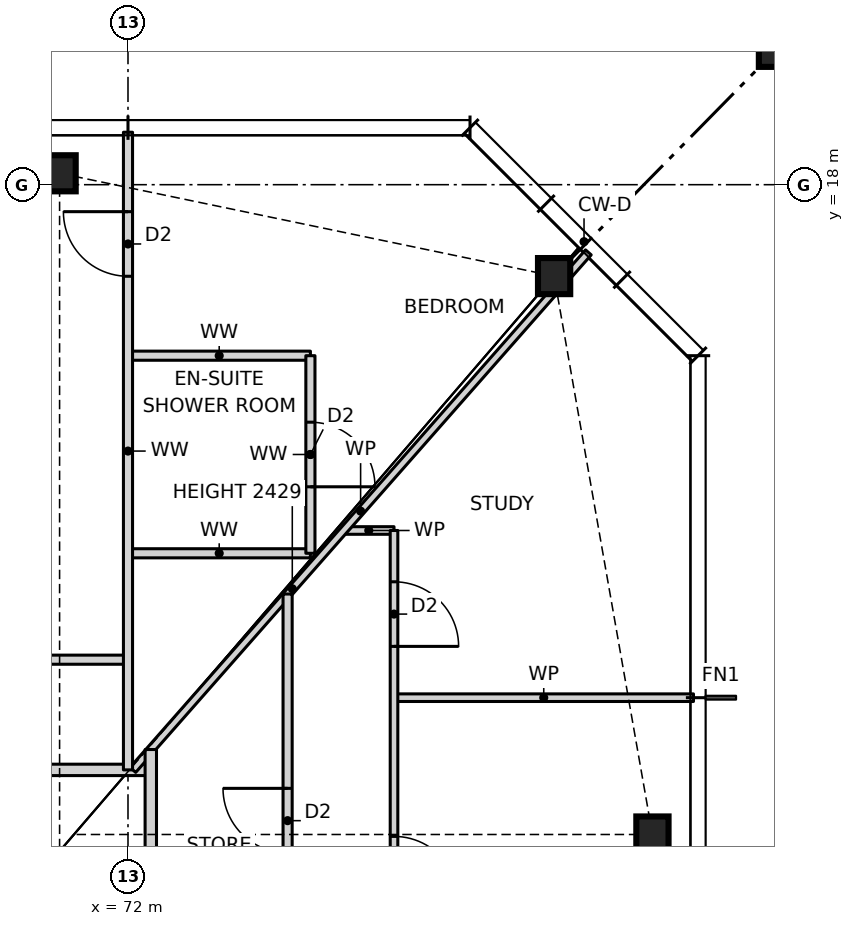
"""IFC4 building model, lengths in metres.
Left out: names, types, materials, properties, quantities, classifications, styles, units other than length and angle.
Written with IfcOpenShell. Run it as: python <this file> out.ifc"""

import sys

from ifc_helpers import new_model, si_unit, direction, frame, frame_2d, origin, origin_2d, place, context, subcontext, project, spatial, rectangle, hollow_rectangle, i_section, extrude, element, fill, save


model = new_model("IFC4")
c1 = context("Model", 3, precision=1e-05, world=origin(), true_north=direction((0.0, 1.0)))
c2 = subcontext(c1, "Body", "Model", "MODEL_VIEW")
j1 = project(units=[si_unit("LENGTHUNIT", "METRE"), si_unit("PLANEANGLEUNIT", "RADIAN")], contexts=[c1])
p1 = place(None, origin())
s1 = spatial("IfcSite", under=j1, at=p1, CompositionType="ELEMENT")
p2 = place(p1, origin())
s2 = spatial("IfcBuilding", under=s1, at=p2, CompositionType="ELEMENT")
p3 = place(p2, frame((0.0, 0.0, 50.0)))
s3 = spatial("IfcBuildingStorey", under=s2, at=p3, CompositionType="ELEMENT", Elevation=50.0)
for number, where, z_axis, x_axis in (
    (1, (78.9, 9.45, 0.0), (0.0, 0.0, 1.0), (1.0, 0.0, 0.0)),
    (2, (77.606, 16.797, 0.0), (0.0, 0.0, 1.0), (1.0, 0.0, 0.0)),
    (3, (71.1, 18.15, 0.0), (0.0, 0.0, 1.0), (1.0, 0.0, 0.0)),
):
    element("IfcColumn", number, at=place(p3, frame(where, z_axis=z_axis, x_axis=x_axis)), inside=s3, PredefinedType="COLUMN", context=c2, shape_type="SweptSolid", body=[
        extrude(i_section(OverallWidth=0.424, OverallDepth=0.475, WebThickness=0.048, FlangeThickness=0.077, at=origin_2d()), origin(), (0.0, 0.0, 1.0), 3.5),
    ])
p4 = place(p3, frame((80.9, 20.15, 0.0), z_axis=(0.0, 0.0, 1.0), x_axis=(1.0, 0.0, 0.0)))
e4 = element("IfcColumn", 4, at=p4, inside=s3, PredefinedType="COLUMN", context=c2, shape_type="SweptSolid", body=[
    extrude(hollow_rectangle(XDim=1.2, YDim=1.2, WallThickness=0.07, at=origin_2d()), origin(), (0.0, 0.0, 1.0), 3.5),
])
p5 = place(p3, frame((53.7, 10.3, 0.0), z_axis=(0.0, 0.0, 1.0), x_axis=(1.0, 0.0, 0.0)))
e5 = element("IfcWall", 5, at=p5, inside=s3, PredefinedType="PARTITIONING", context=c2, shape_type="SweptSolid", body=[
    extrude(rectangle(XDim=18.6, YDim=0.15, at=frame_2d((9.3, 0.0))), origin(), (0.0, 0.0, 1.0), 3.27),
])
p6 = place(p5, frame((12.8, 0.0, 0.0)))
e6 = element("IfcOpeningElement", 6, at=p6, cuts=e5, PredefinedType="OPENING", context=c2, shape_type="SweptSolid", body=[
    extrude(rectangle(XDim=1.0, YDim=2.1, at=frame_2d((0.5, 1.05))), frame((0.0, 0.085, 0.0), z_axis=(0.0, -1.0, 0.0), x_axis=(1.0, 0.0, 0.0)), (0.0, 0.0, 1.0), 0.17),
])
p7 = place(p3, frame((75.5, 11.25, 0.0), z_axis=(0.0, 0.0, 1.0), x_axis=(1.0, 0.0, 0.0)))
e7 = element("IfcWall", 7, at=p7, inside=s3, PredefinedType="PARTITIONING", context=c2, shape_type="SweptSolid", body=[
    extrude(rectangle(XDim=3.94, YDim=0.1, at=frame_2d((1.97, 0.0))), origin(), (0.0, 0.0, 1.0), 3.27),
])
p8 = place(p3, frame((52.66, 11.75, 0.0), z_axis=(0.0, 0.0, 1.0), x_axis=(1.0, 0.0, 0.0)))
e8 = element("IfcWall", 8, at=p8, inside=s3, PredefinedType="PARTITIONING", context=c2, shape_type="SweptSolid", body=[
    extrude(rectangle(XDim=19.34, YDim=0.12, at=frame_2d((9.67, 0.0))), origin(), (0.0, 0.0, 1.0), 3.27),
])
p9 = place(p8, frame((17.115, 0.0, 0.0)))
e9 = element("IfcOpeningElement", 9, at=p9, cuts=e8, PredefinedType="OPENING", context=c2, shape_type="SweptSolid", body=[
    extrude(rectangle(XDim=0.85, YDim=2.1, at=frame_2d((0.425, 1.05))), frame((0.0, 0.07, 0.0), z_axis=(0.0, -1.0, 0.0), x_axis=(1.0, 0.0, 0.0)), (0.0, 0.0, 1.0), 0.14),
])
p10 = place(p8, frame((13.915, 0.0, 0.0)))
e10 = element("IfcOpeningElement", 10, at=p10, cuts=e8, PredefinedType="OPENING", context=c2, shape_type="SweptSolid", body=[
    extrude(rectangle(XDim=0.85, YDim=2.1, at=frame_2d((0.425, 1.05))), frame((0.0, 0.07, 0.0), z_axis=(0.0, -1.0, 0.0), x_axis=(1.0, 0.0, 0.0)), (0.0, 0.0, 1.0), 0.14),
])
p11 = place(p8, frame((7.165, 0.0, 0.0)))
e11 = element("IfcOpeningElement", 11, at=p11, cuts=e8, PredefinedType="OPENING", context=c2, shape_type="SweptSolid", body=[
    extrude(rectangle(XDim=0.85, YDim=2.1, at=frame_2d((0.425, 1.05))), frame((0.0, 0.07, 0.0), z_axis=(0.0, -1.0, 0.0), x_axis=(1.0, 0.0, 0.0)), (0.0, 0.0, 1.0), 0.14),
])
p12 = place(p8, frame((1.995, 0.0, 0.0)))
e12 = element("IfcOpeningElement", 12, at=p12, cuts=e8, PredefinedType="OPENING", context=c2, shape_type="SweptSolid", body=[
    extrude(rectangle(XDim=0.85, YDim=2.1, at=frame_2d((0.425, 1.05))), frame((0.0, 0.07, 0.0), z_axis=(0.0, -1.0, 0.0), x_axis=(1.0, 0.0, 0.0)), (0.0, 0.0, 1.0), 0.14),
])
p13 = place(p3, frame((72.0, 13.15, 0.0), z_axis=(0.0, 0.0, 1.0), x_axis=(1.0, 0.0, 0.0)))
e13 = element("IfcWall", 13, at=p13, inside=s3, PredefinedType="PARTITIONING", context=c2, shape_type="SweptSolid", body=[
    extrude(rectangle(XDim=2.4, YDim=0.12, at=frame_2d((1.2, 0.0))), origin(), (0.0, 0.0, 1.0), 3.27),
])
p14 = place(p3, frame((74.836, 13.45, 0.0), z_axis=(0.0, 0.0, 1.0), x_axis=(1.0, 0.0, 0.0)))
e14 = element("IfcWall", 14, at=p14, inside=s3, PredefinedType="PARTITIONING", context=c2, shape_type="SweptSolid", body=[
    extrude(rectangle(XDim=0.664, YDim=0.1, at=frame_2d((0.332, 0.0))), origin(), (0.0, 0.0, 1.0), 3.27),
])
p15 = place(p3, frame((72.0, 15.75, 0.0), z_axis=(0.0, 0.0, 1.0), x_axis=(1.0, 0.0, 0.0)))
e15 = element("IfcWall", 15, at=p15, inside=s3, PredefinedType="PARTITIONING", context=c2, shape_type="SweptSolid", body=[
    extrude(rectangle(XDim=2.4, YDim=0.12, at=frame_2d((1.2, 0.0))), origin(), (0.0, 0.0, 1.0), 3.27),
])
p16 = place(p3, frame((72.064, 10.3, 0.0), z_axis=(0.0, 0.0, 1.0), x_axis=(0.660700699661, 0.750649442461, 0.0)))
e16 = element("IfcWall", 16, at=p16, inside=s3, PredefinedType="PARTITIONING", context=c2, shape_type="SweptSolid", body=[
    extrude(rectangle(XDim=9.071, YDim=0.1, at=frame_2d((4.535, 0.0))), origin(), (0.0, 0.0, 1.0), 2.429),
])
p17 = place(p3, frame((75.5, 2.25, 0.0), z_axis=(0.0, 0.0, 1.0), x_axis=(0.0, 1.0, 0.0)))
e17 = element("IfcWall", 17, at=p17, inside=s3, PredefinedType="PARTITIONING", context=c2, shape_type="SweptSolid", body=[
    extrude(rectangle(XDim=11.2, YDim=0.1, at=frame_2d((5.6, 0.0))), origin(), (0.0, 0.0, 1.0), 3.27),
])
p18 = place(p17, frame((1.825, 0.0, 0.0)))
e18 = element("IfcOpeningElement", 18, at=p18, cuts=e17, PredefinedType="OPENING", context=c2, shape_type="SweptSolid", body=[
    extrude(rectangle(XDim=0.85, YDim=2.1, at=frame_2d((0.425, 1.05))), frame((0.0, 0.06, 0.0), z_axis=(0.0, -1.0, 0.0), x_axis=(1.0, 0.0, 0.0)), (0.0, 0.0, 1.0), 0.12),
])
p19 = place(p17, frame((6.325, 0.0, 0.0)))
e19 = element("IfcOpeningElement", 19, at=p19, cuts=e17, PredefinedType="OPENING", context=c2, shape_type="SweptSolid", body=[
    extrude(rectangle(XDim=0.85, YDim=2.1, at=frame_2d((0.425, 1.05))), frame((0.0, 0.06, 0.0), z_axis=(0.0, -1.0, 0.0), x_axis=(1.0, 0.0, 0.0)), (0.0, 0.0, 1.0), 0.12),
])
p20 = place(p17, frame((9.675, 0.0, 0.0)))
e20 = element("IfcOpeningElement", 20, at=p20, cuts=e17, PredefinedType="OPENING", context=c2, shape_type="SweptSolid", body=[
    extrude(rectangle(XDim=0.85, YDim=2.1, at=frame_2d((0.425, 1.05))), frame((0.0, 0.06, 0.0), z_axis=(0.0, -1.0, 0.0), x_axis=(1.0, 0.0, 0.0)), (0.0, 0.0, 1.0), 0.12),
])
p21 = place(p3, frame((74.4, 13.15, 0.0), z_axis=(0.0, 0.0, 1.0), x_axis=(0.0, 1.0, 0.0)))
e21 = element("IfcWall", 21, at=p21, inside=s3, PredefinedType="PARTITIONING", context=c2, shape_type="SweptSolid", body=[
    extrude(rectangle(XDim=2.6, YDim=0.12, at=frame_2d((1.3, 0.0))), origin(), (0.0, 0.0, 1.0), 3.27),
])
p22 = place(p21, frame((0.875, 0.0, 0.0)))
e22 = element("IfcOpeningElement", 22, at=p22, cuts=e21, PredefinedType="OPENING", context=c2, shape_type="SweptSolid", body=[
    extrude(rectangle(XDim=0.85, YDim=2.1, at=frame_2d((0.425, 1.05))), frame((0.0, 0.07, 0.0), z_axis=(0.0, -1.0, 0.0), x_axis=(1.0, 0.0, 0.0)), (0.0, 0.0, 1.0), 0.14),
])
p23 = place(p3, frame((74.1, -12.614, 0.0), z_axis=(0.0, 0.0, 1.0), x_axis=(0.0, 1.0, 0.0)))
e23 = element("IfcWall", 23, at=p23, inside=s3, PredefinedType="PARTITIONING", context=c2, shape_type="SweptSolid", body=[
    extrude(rectangle(XDim=25.228, YDim=0.12, at=frame_2d((12.614, 0.0))), origin(), (0.0, 0.0, 1.0), 3.27),
])
p24 = place(p23, frame((7.239, 0.0, 0.0)))
e24 = element("IfcOpeningElement", 24, at=p24, cuts=e23, PredefinedType="OPENING", context=c2, shape_type="SweptSolid", body=[
    extrude(rectangle(XDim=0.85, YDim=2.1, at=frame_2d((0.425, 1.05))), frame((0.0, 0.07, 0.0), z_axis=(0.0, -1.0, 0.0), x_axis=(1.0, 0.0, 0.0)), (0.0, 0.0, 1.0), 0.14),
])
p25 = place(p23, frame((10.439, 0.0, 0.0)))
e25 = element("IfcOpeningElement", 25, at=p25, cuts=e23, PredefinedType="OPENING", context=c2, shape_type="SweptSolid", body=[
    extrude(rectangle(XDim=0.85, YDim=2.1, at=frame_2d((0.425, 1.05))), frame((0.0, 0.07, 0.0), z_axis=(0.0, -1.0, 0.0), x_axis=(1.0, 0.0, 0.0)), (0.0, 0.0, 1.0), 0.14),
])
p26 = place(p23, frame((2.507, 0.0, 0.0)))
e26 = element("IfcOpeningElement", 26, at=p26, cuts=e23, PredefinedType="OPENING", context=c2, shape_type="SweptSolid", body=[
    extrude(rectangle(XDim=0.85, YDim=2.1, at=frame_2d((0.425, 1.05))), frame((0.0, 0.07, 0.0), z_axis=(0.0, -1.0, 0.0), x_axis=(1.0, 0.0, 0.0)), (0.0, 0.0, 1.0), 0.14),
])
p27 = place(p23, frame((16.639, 0.0, 0.0)))
e27 = element("IfcOpeningElement", 27, at=p27, cuts=e23, PredefinedType="OPENING", context=c2, shape_type="SweptSolid", body=[
    extrude(rectangle(XDim=0.85, YDim=2.1, at=frame_2d((0.425, 1.05))), frame((0.0, 0.07, 0.0), z_axis=(0.0, -1.0, 0.0), x_axis=(1.0, 0.0, 0.0)), (0.0, 0.0, 1.0), 0.14),
])
p28 = place(p23, frame((21.821, 0.0, 0.0)))
e28 = element("IfcOpeningElement", 28, at=p28, cuts=e23, PredefinedType="OPENING", context=c2, shape_type="SweptSolid", body=[
    extrude(rectangle(XDim=0.85, YDim=2.1, at=frame_2d((0.425, 1.05))), frame((0.0, 0.07, 0.0), z_axis=(0.0, -1.0, 0.0), x_axis=(1.0, 0.0, 0.0)), (0.0, 0.0, 1.0), 0.14),
])
p29 = place(p3, frame((72.3, -10.568, 0.0), z_axis=(0.0, 0.0, 1.0), x_axis=(0.0, 1.0, 0.0)))
e29 = element("IfcWall", 29, at=p29, inside=s3, PredefinedType="PARTITIONING", context=c2, shape_type="SweptSolid", body=[
    extrude(rectangle(XDim=21.136, YDim=0.15, at=frame_2d((10.568, 0.0))), origin(), (0.0, 0.0, 1.0), 3.27),
])
p30 = place(p29, frame((8.318, 0.0, 0.0)))
e30 = element("IfcOpeningElement", 30, at=p30, cuts=e29, PredefinedType="OPENING", context=c2, shape_type="SweptSolid", body=[
    extrude(rectangle(XDim=1.0, YDim=2.1, at=frame_2d((0.5, 1.05))), frame((0.0, 0.085, 0.0), z_axis=(0.0, -1.0, 0.0), x_axis=(1.0, 0.0, 0.0)), (0.0, 0.0, 1.0), 0.17),
])
p31 = place(p3, frame((72.0, 10.3, 0.0), z_axis=(0.0, 0.0, 1.0), x_axis=(0.0, 1.0, 0.0)))
e31 = element("IfcWall", 31, at=p31, inside=s3, PredefinedType="PARTITIONING", context=c2, shape_type="SweptSolid", body=[
    extrude(rectangle(XDim=8.39, YDim=0.12, at=frame_2d((4.195, 0.0))), origin(), (0.0, 0.0, 1.0), 3.27),
])
p32 = place(p31, frame((6.495, 0.0, 0.0)))
e32 = element("IfcOpeningElement", 32, at=p32, cuts=e31, PredefinedType="OPENING", context=c2, shape_type="SweptSolid", body=[
    extrude(rectangle(XDim=0.85, YDim=2.1, at=frame_2d((0.425, 1.05))), frame((0.0, 0.07, 0.0), z_axis=(0.0, -1.0, 0.0), x_axis=(1.0, 0.0, 0.0)), (0.0, 0.0, 1.0), 0.14),
])
p33 = place(p19, frame((0.85, 0.0, 0.0), z_axis=(0.0, 0.0, 1.0), x_axis=(-1.0, 0.0, 0.0)))
e33 = element("IfcDoor", 33, at=p33, inside=s3, OperationType="SINGLE_SWING_RIGHT", PredefinedType="DOOR", context=c2, shape_type="SweptSolid", body=[
    extrude(rectangle(XDim=0.85, YDim=2.1, at=frame_2d((0.425, 1.05))), frame((0.0, 0.025, 0.0), z_axis=(0.0, -1.0, 0.0), x_axis=(1.0, 0.0, 0.0)), (0.0, 0.0, 1.0), 0.05),
])
fill(e19, e33)
p34 = place(p20, frame((0.85, 0.0, 0.0), z_axis=(0.0, 0.0, 1.0), x_axis=(-1.0, 0.0, 0.0)))
e34 = element("IfcDoor", 34, at=p34, inside=s3, OperationType="SINGLE_SWING_RIGHT", PredefinedType="DOOR", context=c2, shape_type="SweptSolid", body=[
    extrude(rectangle(XDim=0.85, YDim=2.1, at=frame_2d((0.425, 1.05))), frame((0.0, 0.025, 0.0), z_axis=(0.0, -1.0, 0.0), x_axis=(1.0, 0.0, 0.0)), (0.0, 0.0, 1.0), 0.05),
])
fill(e20, e34)
p35 = place(p28, origin())
e35 = element("IfcDoor", 35, at=p35, inside=s3, OperationType="SINGLE_SWING_RIGHT", PredefinedType="DOOR", context=c2, shape_type="SweptSolid", body=[
    extrude(rectangle(XDim=0.85, YDim=2.1, at=frame_2d((0.425, 1.05))), frame((0.0, 0.025, 0.0), z_axis=(0.0, -1.0, 0.0), x_axis=(1.0, 0.0, 0.0)), (0.0, 0.0, 1.0), 0.05),
])
fill(e28, e35)
p36 = place(p22, frame((0.85, 0.0, 0.0), z_axis=(0.0, 0.0, 1.0), x_axis=(-1.0, 0.0, 0.0)))
e36 = element("IfcDoor", 36, at=p36, inside=s3, OperationType="SINGLE_SWING_RIGHT", PredefinedType="DOOR", context=c2, shape_type="SweptSolid", body=[
    extrude(rectangle(XDim=0.85, YDim=2.1, at=frame_2d((0.425, 1.05))), frame((0.0, 0.025, 0.0), z_axis=(0.0, -1.0, 0.0), x_axis=(1.0, 0.0, 0.0)), (0.0, 0.0, 1.0), 0.05),
])
fill(e22, e36)
p37 = place(p32, origin())
e37 = element("IfcDoor", 37, at=p37, inside=s3, OperationType="SINGLE_SWING_RIGHT", PredefinedType="DOOR", context=c2, shape_type="SweptSolid", body=[
    extrude(rectangle(XDim=0.85, YDim=2.1, at=frame_2d((0.425, 1.05))), frame((0.0, 0.025, 0.0), z_axis=(0.0, -1.0, 0.0), x_axis=(1.0, 0.0, 0.0)), (0.0, 0.0, 1.0), 0.05),
])
fill(e32, e37)
save(model, sys.argv[1])
